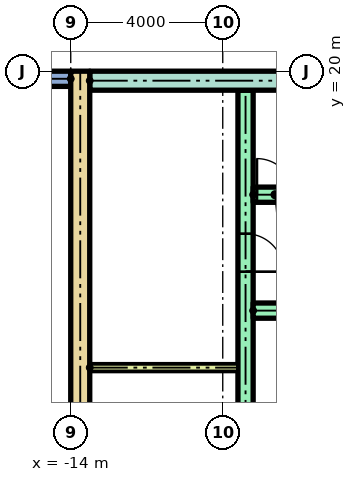
"""IFC4 building model, lengths in metres.
Left out: names, types, materials, properties, quantities, classifications, styles, units other than length and angle.
Written with IfcOpenShell. Run it as: python <this file> out.ifc"""

import sys

from ifc_helpers import new_model, si_unit, direction, frame, frame_2d, origin, place, context, subcontext, project, spatial, rectangle, extrude, element, fill, save


model = new_model("IFC4")
c1 = context("Model", 3, precision=1e-05, world=origin(), true_north=direction((0.0, 1.0)))
c2 = subcontext(c1, "Body", "Model", "MODEL_VIEW")
j1 = project(units=[si_unit("LENGTHUNIT", "METRE"), si_unit("PLANEANGLEUNIT", "RADIAN")], contexts=[c1])
p1 = place(None, origin())
s1 = spatial("IfcSite", under=j1, at=p1, CompositionType="ELEMENT")
p2 = place(p1, origin())
s2 = spatial("IfcBuilding", under=s1, at=p2, CompositionType="ELEMENT")
p3 = place(p2, frame((0.0, 0.0, 18.0)))
s3 = spatial("IfcBuildingStorey", under=s2, at=p3, CompositionType="ELEMENT", Elevation=18.0)
p4 = place(p3, frame((-14.0, 19.8, 0.0), z_axis=(0.0, 0.0, 1.0), x_axis=(-1.0, 0.0, 0.0)))
e1 = element("IfcWall", 1, at=p4, inside=s3, PredefinedType="STANDARD", context=c2, shape_type="SweptSolid", body=[
    extrude(rectangle(XDim=25.6, YDim=0.4, at=frame_2d((12.8, 0.0))), origin(), (0.0, 0.0, 1.0), 3.7),
])
p5 = place(p4, frame((0.8, 0.0, 0.9)))
e2 = element("IfcOpeningElement", 2, at=p5, cuts=e1, PredefinedType="OPENING", context=c2, shape_type="SweptSolid", body=[
    extrude(rectangle(XDim=2.4, YDim=2.1, at=frame_2d((1.2, 1.05))), frame((0.0, 0.21, 0.0), z_axis=(0.0, -1.0, 0.0), x_axis=(1.0, 0.0, 0.0)), (0.0, 0.0, 1.0), 0.42),
])
p6 = place(p4, frame((9.065, 0.0, 0.9)))
e3 = element("IfcOpeningElement", 3, at=p6, cuts=e1, PredefinedType="OPENING", context=c2, shape_type="SweptSolid", body=[
    extrude(rectangle(XDim=2.4, YDim=2.1, at=frame_2d((1.2, 1.05))), frame((0.0, 0.21, 0.0), z_axis=(0.0, -1.0, 0.0), x_axis=(1.0, 0.0, 0.0)), (0.0, 0.0, 1.0), 0.42),
])
p7 = place(p4, frame((20.8, 0.0, 0.9)))
e4 = element("IfcOpeningElement", 4, at=p7, cuts=e1, PredefinedType="OPENING", context=c2, shape_type="SweptSolid", body=[
    extrude(rectangle(XDim=2.4, YDim=2.1, at=frame_2d((1.2, 1.05))), frame((0.0, 0.21, 0.0), z_axis=(0.0, -1.0, 0.0), x_axis=(1.0, 0.0, 0.0)), (0.0, 0.0, 1.0), 0.42),
])
p8 = place(p3, frame((-13.75, 3.0, 0.0), z_axis=(0.0, 0.0, 1.0), x_axis=(0.0, 1.0, 0.0)))
e5 = element("IfcWall", 5, at=p8, inside=s3, PredefinedType="SHEAR", context=c2, shape_type="SweptSolid", body=[
    extrude(rectangle(XDim=17.0, YDim=0.5, at=frame_2d((8.5, 0.0))), origin(), (0.0, 0.0, 1.0), 3.7),
])
p9 = place(p3, frame((-13.5, 19.75, 0.0)))
e6 = element("IfcWall", 6, at=p9, inside=s3, PredefinedType="SHEAR", context=c2, shape_type="SweptSolid", body=[
    extrude(rectangle(XDim=27.0, YDim=0.5, at=frame_2d((13.5, 0.0))), origin(), (0.0, 0.0, 1.0), 3.7),
])
p10 = place(p3, frame((-9.4, 6.8, 0.0), z_axis=(0.0, 0.0, 1.0), x_axis=(0.0, 1.0, 0.0)))
e7 = element("IfcWall", 7, at=p10, inside=s3, PredefinedType="SHEAR", context=c2, shape_type="SweptSolid", body=[
    extrude(rectangle(XDim=12.7, YDim=0.4, at=frame_2d((6.35, 0.0))), origin(), (0.0, 0.0, 1.0), 3.7),
])
p11 = place(p10, frame((0.3, 0.0, 0.0)))
e8 = element("IfcOpeningElement", 8, at=p11, cuts=e7, PredefinedType="OPENING", context=c2, shape_type="SweptSolid", body=[
    extrude(rectangle(XDim=1.0, YDim=2.1, at=frame_2d((0.5, 1.05))), frame((0.0, 0.21, 0.0), z_axis=(0.0, -1.0, 0.0), x_axis=(1.0, 0.0, 0.0)), (0.0, 0.0, 1.0), 0.42),
])
p12 = place(p10, frame((2.05, 0.0, 0.0)))
e9 = element("IfcOpeningElement", 9, at=p12, cuts=e7, PredefinedType="OPENING", context=c2, shape_type="SweptSolid", body=[
    extrude(rectangle(XDim=1.0, YDim=2.1, at=frame_2d((0.5, 1.05))), frame((0.0, 0.21, 0.0), z_axis=(0.0, -1.0, 0.0), x_axis=(1.0, 0.0, 0.0)), (0.0, 0.0, 1.0), 0.42),
])
p13 = place(p10, frame((7.925, 0.0, 0.0)))
e10 = element("IfcOpeningElement", 10, at=p13, cuts=e7, PredefinedType="OPENING", context=c2, shape_type="SweptSolid", body=[
    extrude(rectangle(XDim=1.0, YDim=2.1, at=frame_2d((0.5, 1.05))), frame((0.0, 0.21, 0.0), z_axis=(0.0, -1.0, 0.0), x_axis=(1.0, 0.0, 0.0)), (0.0, 0.0, 1.0), 0.42),
])
p14 = place(p3, frame((-9.2, 13.7, 0.0)))
e11 = element("IfcWall", 11, at=p14, inside=s3, PredefinedType="SHEAR", context=c2, shape_type="SweptSolid", body=[
    extrude(rectangle(XDim=8.0, YDim=0.4, at=frame_2d((4.0, 0.0))), origin(), (0.0, 0.0, 1.0), 3.7),
])
p15 = place(p3, frame((-9.2, 16.75, 0.0)))
e12 = element("IfcWall", 12, at=p15, inside=s3, PredefinedType="SHEAR", context=c2, shape_type="SweptSolid", body=[
    extrude(rectangle(XDim=18.4, YDim=0.4, at=frame_2d((9.2, 0.0))), origin(), (0.0, 0.0, 1.0), 3.7),
])
p16 = place(p15, frame((0.1, 0.0, 0.0)))
e13 = element("IfcOpeningElement", 13, at=p16, cuts=e12, PredefinedType="OPENING", context=c2, shape_type="SweptSolid", body=[
    extrude(rectangle(XDim=0.95, YDim=2.1, at=frame_2d((0.475, 1.05))), frame((0.0, 0.21, 0.0), z_axis=(0.0, -1.0, 0.0), x_axis=(1.0, 0.0, 0.0)), (0.0, 0.0, 1.0), 0.42),
])
p17 = place(p15, frame((6.1, 0.0, 0.0)))
e14 = element("IfcOpeningElement", 14, at=p17, cuts=e12, PredefinedType="OPENING", context=c2, shape_type="SweptSolid", body=[
    extrude(rectangle(XDim=0.95, YDim=2.1, at=frame_2d((0.475, 1.05))), frame((0.0, 0.21, 0.0), z_axis=(0.0, -1.0, 0.0), x_axis=(1.0, 0.0, 0.0)), (0.0, 0.0, 1.0), 0.42),
])
p18 = place(p15, frame((12.1, 0.0, 0.0)))
e15 = element("IfcOpeningElement", 15, at=p18, cuts=e12, PredefinedType="OPENING", context=c2, shape_type="SweptSolid", body=[
    extrude(rectangle(XDim=0.95, YDim=2.1, at=frame_2d((0.475, 1.05))), frame((0.0, 0.21, 0.0), z_axis=(0.0, -1.0, 0.0), x_axis=(1.0, 0.0, 0.0)), (0.0, 0.0, 1.0), 0.42),
])
p19 = place(p3, frame((-13.5, 12.2, 0.0)))
e16 = element("IfcWall", 16, at=p19, inside=s3, PredefinedType="PARTITIONING", context=c2, shape_type="SweptSolid", body=[
    extrude(rectangle(XDim=3.9, YDim=0.2, at=frame_2d((1.95, 0.0))), origin(), (0.0, 0.0, 1.0), 3.7),
])
p20 = place(p16, origin())
e17 = element("IfcDoor", 17, at=p20, inside=s3, OperationType="SINGLE_SWING_LEFT", PredefinedType="DOOR", context=c2, shape_type="SweptSolid", body=[
    extrude(rectangle(XDim=0.95, YDim=2.1, at=frame_2d((0.475, 1.05))), frame((0.0, 0.025, 0.0), z_axis=(0.0, -1.0, 0.0), x_axis=(1.0, 0.0, 0.0)), (0.0, 0.0, 1.0), 0.05),
])
fill(e13, e17)
p21 = place(p13, frame((1.0, 0.0, 0.0), z_axis=(0.0, 0.0, 1.0), x_axis=(-1.0, 0.0, 0.0)))
e18 = element("IfcDoor", 18, at=p21, inside=s3, OperationType="SINGLE_SWING_LEFT", PredefinedType="DOOR", context=c2, shape_type="SweptSolid", body=[
    extrude(rectangle(XDim=1.0, YDim=2.1, at=frame_2d((0.5, 1.05))), frame((0.0, 0.025, 0.0), z_axis=(0.0, -1.0, 0.0), x_axis=(1.0, 0.0, 0.0)), (0.0, 0.0, 1.0), 0.05),
])
fill(e10, e18)
save(model, sys.argv[1])
